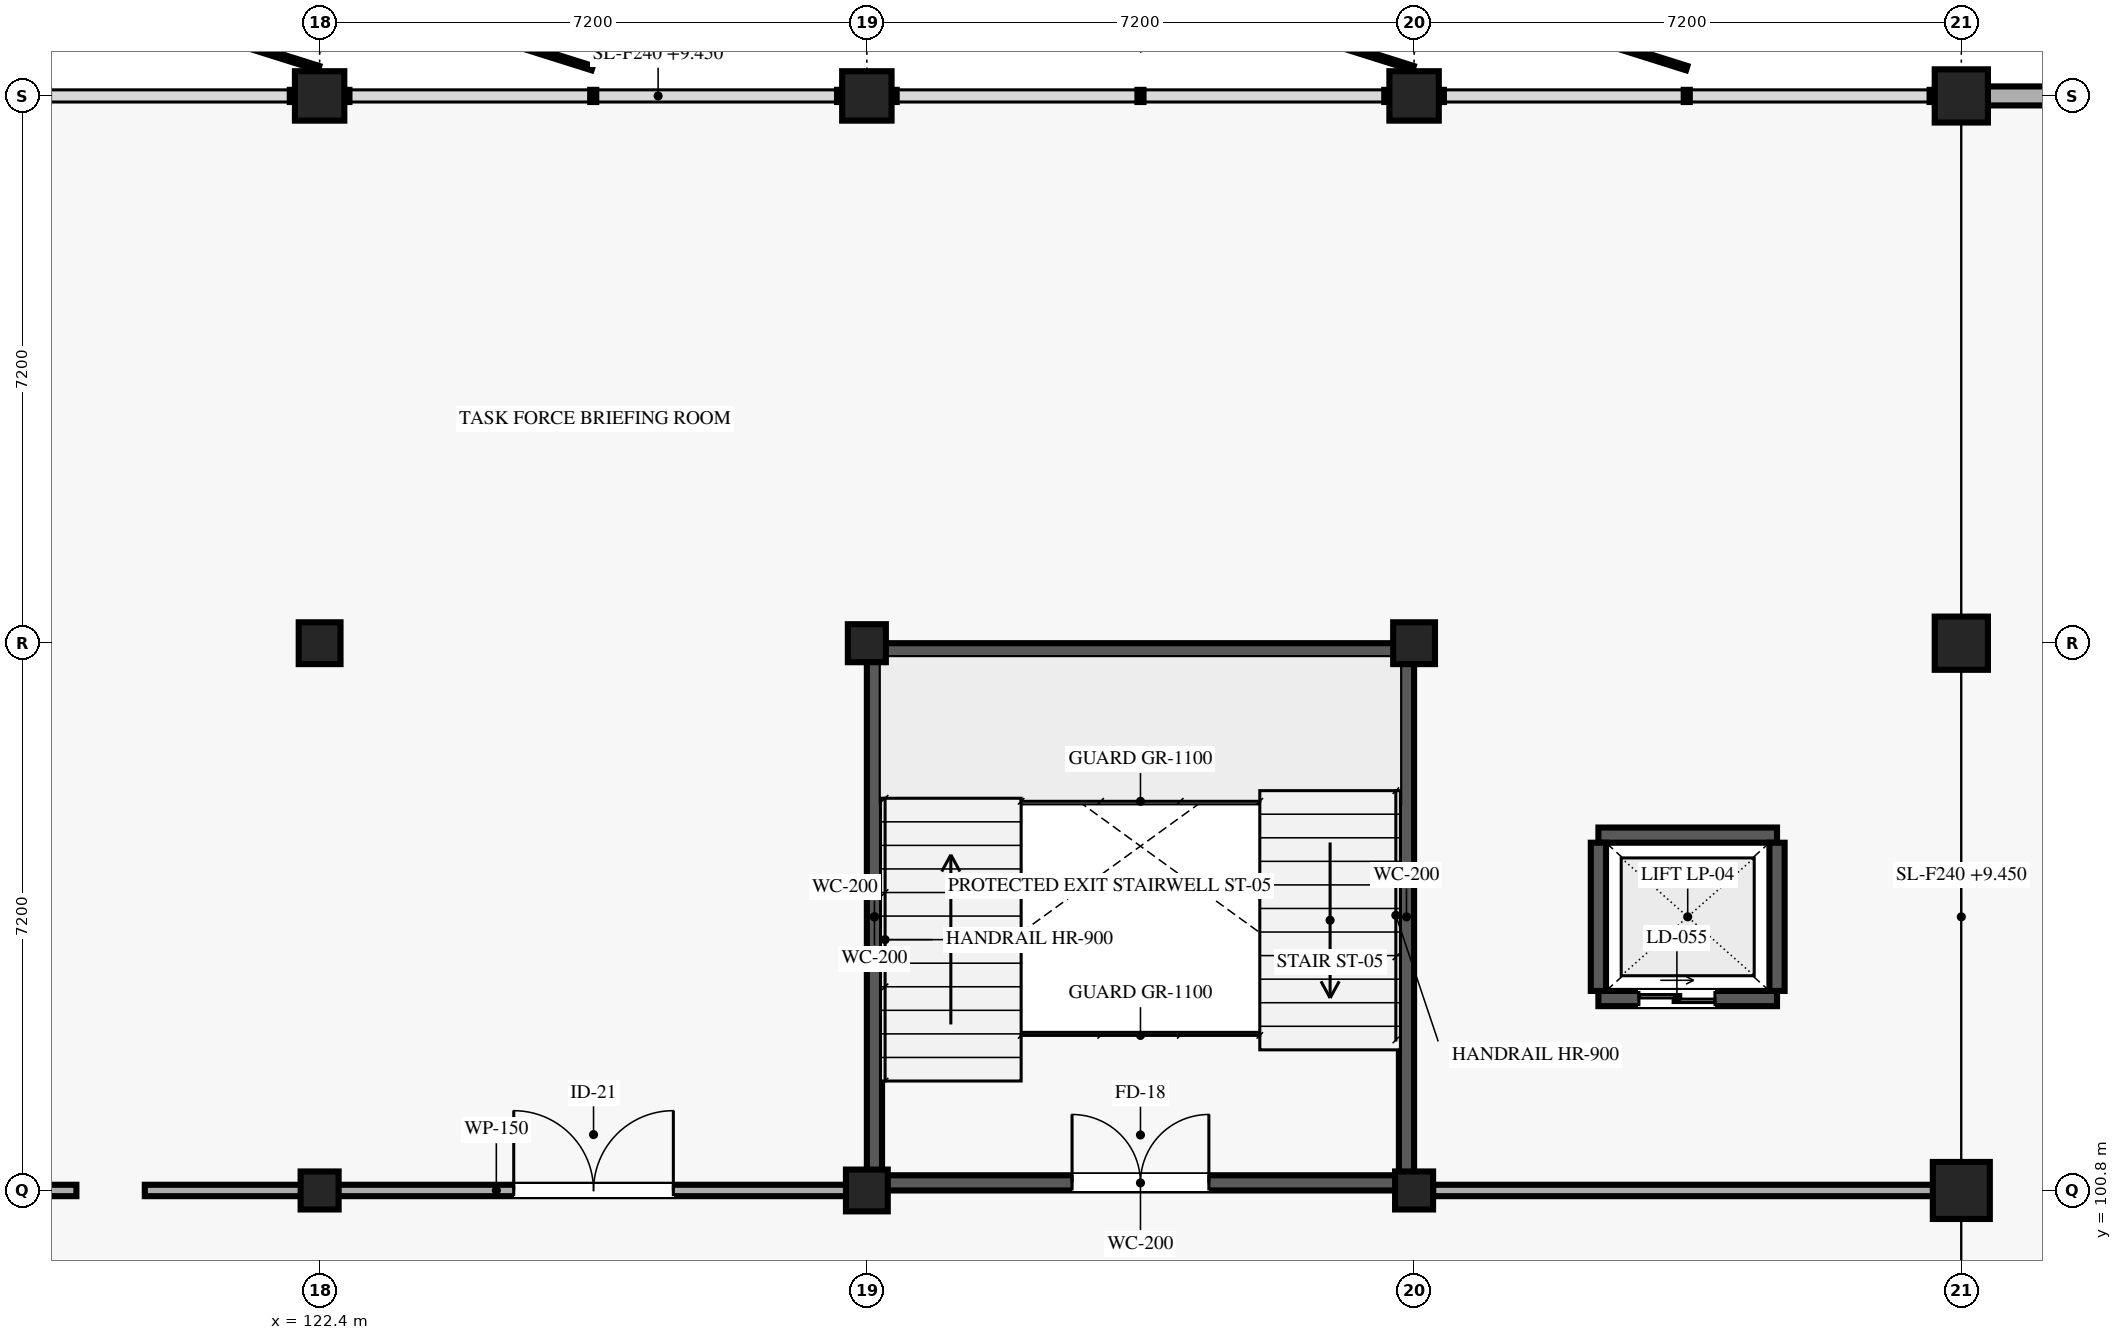
"""IFC4 building model, lengths in metres.
Left out: names, types, materials, properties, quantities, classifications, styles, units other than length and angle.
Written with IfcOpenShell. Run it as: python <this file> out.ifc"""

import sys

from ifc_helpers import new_model, si_unit, direction, frame, frame_2d, origin, origin_2d, place, context, subcontext, project, spatial, rectangle, extrude, element, fill, save


model = new_model("IFC4")
c1 = context("Model", 3, precision=1e-05, world=origin(), true_north=direction((0.0, 1.0)))
c2 = subcontext(c1, "Body", "Model", "MODEL_VIEW")
j1 = project(units=[si_unit("LENGTHUNIT", "METRE"), si_unit("PLANEANGLEUNIT", "RADIAN")], contexts=[c1])
p1 = place(None, origin())
s1 = spatial("IfcSite", under=j1, at=p1, CompositionType="ELEMENT")
p2 = place(p1, origin())
s2 = spatial("IfcBuilding", under=s1, at=p2, CompositionType="ELEMENT")
p3 = place(p2, frame((0.0, 0.0, 9.45)))
s3 = spatial("IfcBuildingStorey", under=s2, at=p3, CompositionType="ELEMENT", Elevation=9.45)
p4 = place(p3, frame((122.4, 100.8, 0.0), z_axis=(0.0, 0.0, 1.0), x_axis=(1.0, 0.0, 0.0)))
e1 = element("IfcColumn", 1, at=p4, inside=s3, PredefinedType="COLUMN", context=c2, shape_type="SweptSolid", body=[
    extrude(rectangle(XDim=0.5, YDim=0.5, at=origin_2d()), origin(), (0.0, 0.0, 1.0), 4.05),
])
p5 = place(p3, frame((122.4, 108.0, 0.0), z_axis=(0.0, 0.0, 1.0), x_axis=(1.0, 0.0, 0.0)))
e2 = element("IfcColumn", 2, at=p5, inside=s3, PredefinedType="COLUMN", context=c2, shape_type="SweptSolid", body=[
    extrude(rectangle(XDim=0.55, YDim=0.55, at=origin_2d()), origin(), (0.0, 0.0, 1.0), 4.05),
])
p6 = place(p3, frame((122.4, 115.2, 0.0), z_axis=(0.0, 0.0, 1.0), x_axis=(1.0, 0.0, 0.0)))
e3 = element("IfcColumn", 3, at=p6, inside=s3, PredefinedType="COLUMN", context=c2, shape_type="SweptSolid", body=[
    extrude(rectangle(XDim=0.65, YDim=0.65, at=origin_2d()), origin(), (0.0, 0.0, 1.0), 4.05),
])
p7 = place(p3, frame((129.6, 100.8, 0.0), z_axis=(0.0, 0.0, 1.0), x_axis=(1.0, 0.0, 0.0)))
e4 = element("IfcColumn", 4, at=p7, inside=s3, PredefinedType="COLUMN", context=c2, shape_type="SweptSolid", body=[
    extrude(rectangle(XDim=0.55, YDim=0.55, at=origin_2d()), origin(), (0.0, 0.0, 1.0), 4.05),
])
p8 = place(p3, frame((129.6, 108.0, 0.0), z_axis=(0.0, 0.0, 1.0), x_axis=(1.0, 0.0, 0.0)))
e5 = element("IfcColumn", 5, at=p8, inside=s3, PredefinedType="COLUMN", context=c2, shape_type="SweptSolid", body=[
    extrude(rectangle(XDim=0.5, YDim=0.5, at=origin_2d()), origin(), (0.0, 0.0, 1.0), 4.05),
])
p9 = place(p3, frame((129.6, 115.2, 0.0), z_axis=(0.0, 0.0, 1.0), x_axis=(1.0, 0.0, 0.0)))
e6 = element("IfcColumn", 6, at=p9, inside=s3, PredefinedType="COLUMN", context=c2, shape_type="SweptSolid", body=[
    extrude(rectangle(XDim=0.65, YDim=0.65, at=origin_2d()), origin(), (0.0, 0.0, 1.0), 4.05),
])
p10 = place(p3, frame((136.8, 100.8, 0.0), z_axis=(0.0, 0.0, 1.0), x_axis=(1.0, 0.0, 0.0)))
e7 = element("IfcColumn", 7, at=p10, inside=s3, PredefinedType="COLUMN", context=c2, shape_type="SweptSolid", body=[
    extrude(rectangle(XDim=0.5, YDim=0.5, at=origin_2d()), origin(), (0.0, 0.0, 1.0), 4.05),
])
p11 = place(p3, frame((136.8, 108.0, 0.0), z_axis=(0.0, 0.0, 1.0), x_axis=(1.0, 0.0, 0.0)))
e8 = element("IfcColumn", 8, at=p11, inside=s3, PredefinedType="COLUMN", context=c2, shape_type="SweptSolid", body=[
    extrude(rectangle(XDim=0.55, YDim=0.55, at=origin_2d()), origin(), (0.0, 0.0, 1.0), 4.05),
])
p12 = place(p3, frame((136.8, 115.2, 0.0), z_axis=(0.0, 0.0, 1.0), x_axis=(1.0, 0.0, 0.0)))
e9 = element("IfcColumn", 9, at=p12, inside=s3, PredefinedType="COLUMN", context=c2, shape_type="SweptSolid", body=[
    extrude(rectangle(XDim=0.65, YDim=0.65, at=origin_2d()), origin(), (0.0, 0.0, 1.0), 4.05),
])
p13 = place(p3, frame((144.0, 100.8, 0.0), z_axis=(0.0, 0.0, 1.0), x_axis=(1.0, 0.0, 0.0)))
e10 = element("IfcColumn", 10, at=p13, inside=s3, PredefinedType="COLUMN", context=c2, shape_type="SweptSolid", body=[
    extrude(rectangle(XDim=0.75, YDim=0.75, at=origin_2d()), origin(), (0.0, 0.0, 1.0), 4.05),
])
for number, where, z_axis, x_axis in (
    (11, (144.0, 108.0, 0.0), (0.0, 0.0, 1.0), (1.0, 0.0, 0.0)),
    (12, (144.0, 115.2, 0.0), (0.0, 0.0, 1.0), (1.0, 0.0, 0.0)),
):
    element("IfcColumn", number, at=place(p3, frame(where, z_axis=z_axis, x_axis=x_axis)), inside=s3, PredefinedType="COLUMN", context=c2, shape_type="SweptSolid", body=[
        extrude(rectangle(XDim=0.7, YDim=0.7, at=origin_2d()), origin(), (0.0, 0.0, 1.0), 4.05),
    ])
p14 = place(p3, frame((144.345, 115.2, 0.0), z_axis=(0.0, 0.0, 1.0), x_axis=(1.0, 0.0, 0.0)))
e13 = element("IfcWall", 13, at=p14, inside=s3, PredefinedType="SOLIDWALL", context=c2, shape_type="SweptSolid", body=[
    extrude(rectangle(XDim=6.51, YDim=0.25, at=frame_2d((3.255, 0.0))), origin(), (0.0, 0.0, 1.0), 3.195),
])
p15 = place(p14, frame((1.755, 0.0, 0.85)))
e14 = element("IfcOpeningElement", 14, at=p15, cuts=e13, PredefinedType="OPENING", context=c2, shape_type="SweptSolid", body=[
    extrude(rectangle(XDim=3.0, YDim=1.9, at=frame_2d((1.5, 0.95))), frame((0.0, 0.135, 0.0), z_axis=(0.0, -1.0, 0.0), x_axis=(1.0, 0.0, 0.0)), (0.0, 0.0, 1.0), 0.27),
])
p16 = place(p3, frame((129.8, 100.9, 0.0), z_axis=(0.0, 0.0, 1.0), x_axis=(1.0, 0.0, 0.0)))
e15 = element("IfcWall", 15, at=p16, inside=s3, PredefinedType="SHEAR", context=c2, shape_type="SweptSolid", body=[
    extrude(rectangle(XDim=6.8, YDim=0.2, at=frame_2d((3.4, 0.0))), origin(), (0.0, 0.0, 1.0), 3.81),
])
p17 = place(p16, frame((2.5, 0.0, 0.0)))
e16 = element("IfcOpeningElement", 16, at=p17, cuts=e15, PredefinedType="OPENING", context=c2, shape_type="SweptSolid", body=[
    extrude(rectangle(XDim=1.8, YDim=2.2, at=frame_2d((0.9, 1.1))), frame((0.0, 0.11, 0.0), z_axis=(0.0, -1.0, 0.0), x_axis=(1.0, 0.0, 0.0)), (0.0, 0.0, 1.0), 0.22),
])
for number, where, z_axis, x_axis in (
    (17, (129.8, 107.9, 0.0), (0.0, 0.0, 1.0), (1.0, 0.0, 0.0)),
    (18, (129.7, 101.0, 0.0), (0.0, 0.0, 1.0), (0.0, 1.0, 0.0)),
    (19, (136.7, 101.0, 0.0), (0.0, 0.0, 1.0), (0.0, 1.0, 0.0)),
):
    element("IfcWall", number, at=place(p3, frame(where, z_axis=z_axis, x_axis=x_axis)), inside=s3, PredefinedType="SHEAR", context=c2, shape_type="SweptSolid", body=[
        extrude(rectangle(XDim=6.8, YDim=0.2, at=frame_2d((3.4, 0.0))), origin(), (0.0, 0.0, 1.0), 3.81),
    ])
p18 = place(p3, frame((139.225, 103.325, 0.0), z_axis=(0.0, 0.0, 1.0), x_axis=(1.0, 0.0, 0.0)))
e20 = element("IfcWall", 20, at=p18, inside=s3, PredefinedType="SHEAR", context=c2, shape_type="SweptSolid", body=[
    extrude(rectangle(XDim=2.35, YDim=0.2, at=frame_2d((1.175, 0.0))), origin(), (0.0, 0.0, 1.0), 3.81),
])
p19 = place(p18, frame((0.533, 0.0, 0.0)))
e21 = element("IfcOpeningElement", 21, at=p19, cuts=e20, PredefinedType="OPENING", context=c2, shape_type="SweptSolid", body=[
    extrude(rectangle(XDim=1.0, YDim=2.1, at=frame_2d((0.5, 1.05))), frame((0.0, 0.11, 0.0), z_axis=(0.0, -1.0, 0.0), x_axis=(1.0, 0.0, 0.0)), (0.0, 0.0, 1.0), 0.22),
])
p20 = place(p3, frame((139.225, 105.475, 0.0), z_axis=(0.0, 0.0, 1.0), x_axis=(1.0, 0.0, 0.0)))
e22 = element("IfcWall", 22, at=p20, inside=s3, PredefinedType="SHEAR", context=c2, shape_type="SweptSolid", body=[
    extrude(rectangle(XDim=2.35, YDim=0.2, at=frame_2d((1.175, 0.0))), origin(), (0.0, 0.0, 1.0), 3.81),
])
for number, where, z_axis, x_axis in (
    (23, (139.225, 103.425, 0.0), (0.0, 0.0, 1.0), (0.0, 1.0, 0.0)),
    (24, (141.575, 103.425, 0.0), (0.0, 0.0, 1.0), (0.0, 1.0, 0.0)),
):
    element("IfcWall", number, at=place(p3, frame(where, z_axis=z_axis, x_axis=x_axis)), inside=s3, PredefinedType="SHEAR", context=c2, shape_type="SweptSolid", body=[
        extrude(rectangle(XDim=1.95, YDim=0.2, at=frame_2d((0.975, 0.0))), origin(), (0.0, 0.0, 1.0), 3.81),
    ])
p21 = place(p3, frame((94.1, 100.8, 0.0), z_axis=(0.0, 0.0, 1.0), x_axis=(1.0, 0.0, 0.0)))
e25 = element("IfcWall", 25, at=p21, inside=s3, PredefinedType="PARTITIONING", context=c2, shape_type="SweptSolid", body=[
    extrude(rectangle(XDim=25.1, YDim=0.15, at=frame_2d((12.55, 0.0))), origin(), (0.0, 0.0, 1.0), 3.2),
])
p22 = place(p21, frame((9.25, 0.0, 0.0)))
e26 = element("IfcOpeningElement", 26, at=p22, cuts=e25, PredefinedType="OPENING", context=c2, shape_type="SweptSolid", body=[
    extrude(rectangle(XDim=2.1, YDim=2.4, at=frame_2d((1.05, 1.2))), frame((0.0, 0.085, 0.0), z_axis=(0.0, -1.0, 0.0), x_axis=(1.0, 0.0, 0.0)), (0.0, 0.0, 1.0), 0.17),
])
p23 = place(p3, frame((120.1, 100.8, 0.0), z_axis=(0.0, 0.0, 1.0), x_axis=(1.0, 0.0, 0.0)))
e27 = element("IfcWall", 27, at=p23, inside=s3, PredefinedType="PARTITIONING", context=c2, shape_type="SweptSolid", body=[
    extrude(rectangle(XDim=9.25, YDim=0.15, at=frame_2d((4.625, 0.0))), origin(), (0.0, 0.0, 1.0), 3.2),
])
p24 = place(p23, frame((4.854, 0.0, 0.0)))
e28 = element("IfcOpeningElement", 28, at=p24, cuts=e27, PredefinedType="OPENING", context=c2, shape_type="SweptSolid", body=[
    extrude(rectangle(XDim=2.1, YDim=2.4, at=frame_2d((1.05, 1.2))), frame((0.0, 0.085, 0.0), z_axis=(0.0, -1.0, 0.0), x_axis=(1.0, 0.0, 0.0)), (0.0, 0.0, 1.0), 0.17),
])
p25 = place(p3, frame((137.05, 100.8, 0.0), z_axis=(0.0, 0.0, 1.0), x_axis=(1.0, 0.0, 0.0)))
e29 = element("IfcWall", 29, at=p25, inside=s3, PredefinedType="PARTITIONING", context=c2, shape_type="SweptSolid", body=[
    extrude(rectangle(XDim=6.8, YDim=0.15, at=frame_2d((3.4, 0.0))), origin(), (0.0, 0.0, 1.0), 3.2),
])
p26 = place(p17, origin())
e30 = element("IfcDoor", 30, at=p26, inside=s3, OperationType="DOUBLE_DOOR_SINGLE_SWING", PredefinedType="DOOR", context=c2, shape_type="SweptSolid", body=[
    extrude(rectangle(XDim=1.8, YDim=2.2, at=frame_2d((0.9, 1.1))), frame((0.0, 0.025, 0.0), z_axis=(0.0, -1.0, 0.0), x_axis=(1.0, 0.0, 0.0)), (0.0, 0.0, 1.0), 0.05),
])
fill(e16, e30)
p27 = place(p19, origin())
e31 = element("IfcDoor", 31, at=p27, inside=s3, OperationType="DOUBLE_DOOR_SLIDING", PredefinedType="DOOR", context=c2, shape_type="SweptSolid", body=[
    extrude(rectangle(XDim=1.0, YDim=2.1, at=frame_2d((0.5, 1.05))), frame((0.0, 0.025, 0.0), z_axis=(0.0, -1.0, 0.0), x_axis=(1.0, 0.0, 0.0)), (0.0, 0.0, 1.0), 0.05),
])
fill(e21, e31)
p28 = place(p24, origin())
e32 = element("IfcDoor", 32, at=p28, inside=s3, OperationType="DOUBLE_DOOR_SINGLE_SWING", PredefinedType="DOOR", context=c2, shape_type="SweptSolid", body=[
    extrude(rectangle(XDim=2.1, YDim=2.4, at=frame_2d((1.05, 1.2))), frame((0.0, 0.025, 0.0), z_axis=(0.0, -1.0, 0.0), x_axis=(1.0, 0.0, 0.0)), (0.0, 0.0, 1.0), 0.05),
])
fill(e28, e32)
save(model, sys.argv[1])
